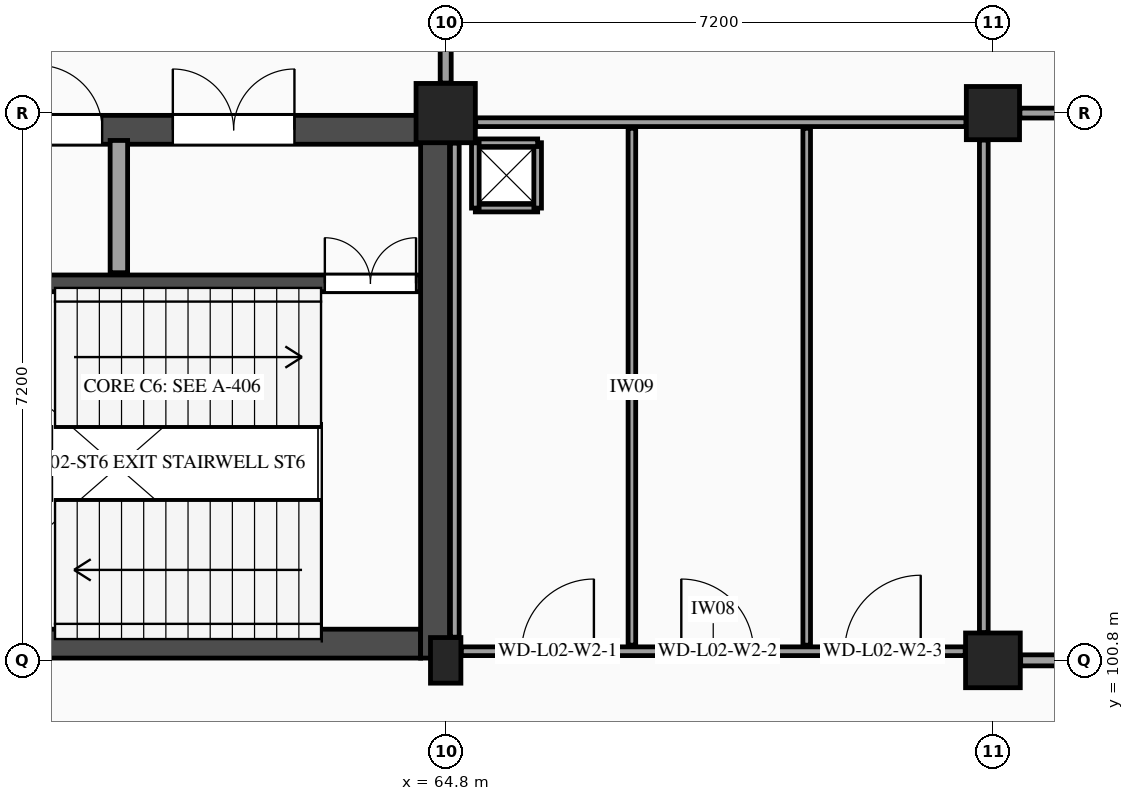
"""IFC4 building model, lengths in metres.
Left out: names, types, materials, properties, quantities, classifications, styles, units other than length and angle.
Written with IfcOpenShell. Run it as: python <this file> out.ifc"""

import sys

from ifc_helpers import new_model, si_unit, direction, frame, frame_2d, origin, origin_2d, place, context, subcontext, project, spatial, rectangle, extrude, element, fill, save


model = new_model("IFC4")
c1 = context("Model", 3, precision=1e-05, world=origin(), true_north=direction((0.0, 1.0)))
c2 = subcontext(c1, "Body", "Model", "MODEL_VIEW")
j1 = project(units=[si_unit("LENGTHUNIT", "METRE"), si_unit("PLANEANGLEUNIT", "RADIAN")], contexts=[c1])
p1 = place(None, origin())
s1 = spatial("IfcSite", under=j1, at=p1, CompositionType="ELEMENT")
p2 = place(p1, origin())
s2 = spatial("IfcBuilding", under=s1, at=p2, CompositionType="ELEMENT")
p3 = place(p2, frame((0.0, 0.0, 9.9)))
s3 = spatial("IfcBuildingStorey", under=s2, at=p3, CompositionType="ELEMENT", Elevation=9.9)
p4 = place(p3, frame((64.8, 100.8, 0.0), z_axis=(0.0, 0.0, 1.0), x_axis=(1.0, 0.0, 0.0)))
e1 = element("IfcColumn", 1, at=p4, inside=s3, PredefinedType="PILASTER", context=c2, shape_type="SweptSolid", body=[
    extrude(rectangle(XDim=0.4, YDim=0.6, at=origin_2d()), origin(), (0.0, 0.0, 1.0), 4.5),
])
p5 = place(p3, frame((64.8, 108.0, 0.0), z_axis=(0.0, 0.0, 1.0), x_axis=(1.0, 0.0, 0.0)))
e2 = element("IfcColumn", 2, at=p5, inside=s3, PredefinedType="COLUMN", context=c2, shape_type="SweptSolid", body=[
    extrude(rectangle(XDim=0.78, YDim=0.78, at=origin_2d()), origin(), (0.0, 0.0, 1.0), 4.5),
])
p6 = place(p3, frame((72.0, 100.8, 0.0), z_axis=(0.0, 0.0, 1.0), x_axis=(1.0, 0.0, 0.0)))
e3 = element("IfcColumn", 3, at=p6, inside=s3, PredefinedType="COLUMN", context=c2, shape_type="SweptSolid", body=[
    extrude(rectangle(XDim=0.72, YDim=0.72, at=origin_2d()), origin(), (0.0, 0.0, 1.0), 4.5),
])
p7 = place(p3, frame((72.0, 108.0, 0.0), z_axis=(0.0, 0.0, 1.0), x_axis=(1.0, 0.0, 0.0)))
e4 = element("IfcColumn", 4, at=p7, inside=s3, PredefinedType="COLUMN", context=c2, shape_type="SweptSolid", body=[
    extrude(rectangle(XDim=0.7, YDim=0.7, at=origin_2d()), origin(), (0.0, 0.0, 1.0), 4.5),
])
p8 = place(p3, frame((58.01, 101.02, 0.0), z_axis=(0.0, 0.0, 1.0), x_axis=(1.0, 0.0, 0.0)))
e5 = element("IfcWall", 5, at=p8, inside=s3, PredefinedType="SHEAR", context=c2, shape_type="SweptSolid", body=[
    extrude(rectangle(XDim=6.46, YDim=0.38, at=frame_2d((3.23, 0.0))), origin(), (0.0, 0.0, 1.0), 4.225),
])
p9 = place(p3, frame((58.01, 107.78, 0.0), z_axis=(0.0, 0.0, 1.0), x_axis=(1.0, 0.0, 0.0)))
e6 = element("IfcWall", 6, at=p9, inside=s3, PredefinedType="SHEAR", context=c2, shape_type="SweptSolid", body=[
    extrude(rectangle(XDim=6.46, YDim=0.38, at=frame_2d((3.23, 0.0))), origin(), (0.0, 0.0, 1.0), 4.225),
])
p10 = place(p9, frame((1.42, 0.0, 0.0)))
e7 = element("IfcOpeningElement", 7, at=p10, cuts=e6, PredefinedType="OPENING", context=c2, shape_type="SweptSolid", body=[
    extrude(rectangle(XDim=0.85, YDim=2.1, at=frame_2d((0.425, 1.05))), frame((0.0, 0.2, 0.0), z_axis=(0.0, -1.0, 0.0), x_axis=(1.0, 0.0, 0.0)), (0.0, 0.0, 1.0), 0.4),
])
p11 = place(p9, frame((3.2, 0.0, 0.0)))
e8 = element("IfcOpeningElement", 8, at=p11, cuts=e6, PredefinedType="OPENING", context=c2, shape_type="SweptSolid", body=[
    extrude(rectangle(XDim=1.6, YDim=2.2, at=frame_2d((0.8, 1.1))), frame((0.0, 0.2, 0.0), z_axis=(0.0, -1.0, 0.0), x_axis=(1.0, 0.0, 0.0)), (0.0, 0.0, 1.0), 0.4),
])
p12 = place(p3, frame((58.01, 105.76, 0.0), z_axis=(0.0, 0.0, 1.0), x_axis=(1.0, 0.0, 0.0)))
e9 = element("IfcWall", 9, at=p12, inside=s3, PredefinedType="SHEAR", context=c2, shape_type="SweptSolid", body=[
    extrude(rectangle(XDim=6.46, YDim=0.22, at=frame_2d((3.23, 0.0))), origin(), (0.0, 0.0, 1.0), 4.225),
])
p13 = place(p12, frame((5.2, 0.0, 0.0)))
e10 = element("IfcOpeningElement", 10, at=p13, cuts=e9, PredefinedType="OPENING", context=c2, shape_type="SweptSolid", body=[
    extrude(rectangle(XDim=1.2, YDim=2.2, at=frame_2d((0.6, 1.1))), frame((0.0, 0.12, 0.0), z_axis=(0.0, -1.0, 0.0), x_axis=(1.0, 0.0, 0.0)), (0.0, 0.0, 1.0), 0.24),
])
p14 = place(p3, frame((60.5, 105.9, 0.0), z_axis=(0.0, 0.0, 1.0), x_axis=(0.0, 1.0, 0.0)))
e11 = element("IfcWall", 11, at=p14, inside=s3, PredefinedType="PARTITIONING", context=c2, shape_type="SweptSolid", body=[
    extrude(rectangle(XDim=1.74, YDim=0.23, at=frame_2d((0.87, 0.0))), origin(), (0.0, 0.0, 1.0), 4.225),
])
p15 = place(p3, frame((64.66, 100.83, 0.0), z_axis=(0.0, 0.0, 1.0), x_axis=(0.0, 1.0, 0.0)))
e12 = element("IfcWall", 12, at=p15, inside=s3, PredefinedType="SHEAR", context=c2, shape_type="SweptSolid", body=[
    extrude(rectangle(XDim=7.14, YDim=0.38, at=frame_2d((3.57, 0.0))), origin(), (0.0, 0.0, 1.0), 4.225),
])
p16 = place(p3, frame((65.005, 100.92, 0.0), z_axis=(0.0, 0.0, 1.0), x_axis=(1.0, 0.0, 0.0)))
e13 = element("IfcWall", 13, at=p16, inside=s3, PredefinedType="PARTITIONING", context=c2, shape_type="SweptSolid", body=[
    extrude(rectangle(XDim=6.63, YDim=0.115, at=frame_2d((3.315, 0.0))), origin(), (0.0, 0.0, 1.0), 3.475),
])
p17 = place(p16, frame((0.795, 0.0, 0.0)))
e14 = element("IfcOpeningElement", 14, at=p17, cuts=e13, PredefinedType="OPENING", context=c2, shape_type="SweptSolid", body=[
    extrude(rectangle(XDim=0.95, YDim=2.1, at=frame_2d((0.475, 1.05))), frame((0.0, 0.067, 0.0), z_axis=(0.0, -1.0, 0.0), x_axis=(1.0, 0.0, 0.0)), (0.0, 0.0, 1.0), 0.135),
])
p18 = place(p16, frame((2.895, 0.0, 0.0)))
e15 = element("IfcOpeningElement", 15, at=p18, cuts=e13, PredefinedType="OPENING", context=c2, shape_type="SweptSolid", body=[
    extrude(rectangle(XDim=0.95, YDim=2.1, at=frame_2d((0.475, 1.05))), frame((0.0, 0.067, 0.0), z_axis=(0.0, -1.0, 0.0), x_axis=(1.0, 0.0, 0.0)), (0.0, 0.0, 1.0), 0.135),
])
p19 = place(p16, frame((5.045, 0.0, 0.0)))
e16 = element("IfcOpeningElement", 16, at=p19, cuts=e13, PredefinedType="OPENING", context=c2, shape_type="SweptSolid", body=[
    extrude(rectangle(XDim=1.0, YDim=2.15, at=frame_2d((0.5, 1.075))), frame((0.0, 0.067, 0.0), z_axis=(0.0, -1.0, 0.0), x_axis=(1.0, 0.0, 0.0)), (0.0, 0.0, 1.0), 0.135),
])
p20 = place(p3, frame((65.195, 107.88, 0.0), z_axis=(0.0, 0.0, 1.0), x_axis=(1.0, 0.0, 0.0)))
e17 = element("IfcWall", 17, at=p20, inside=s3, PredefinedType="PARTITIONING", context=c2, shape_type="SweptSolid", body=[
    extrude(rectangle(XDim=6.45, YDim=0.115, at=frame_2d((3.225, 0.0))), origin(), (0.0, 0.0, 1.0), 3.475),
])
p21 = place(p3, frame((64.92, 101.105, 0.0), z_axis=(0.0, 0.0, 1.0), x_axis=(0.0, 1.0, 0.0)))
e18 = element("IfcWall", 18, at=p21, inside=s3, PredefinedType="PARTITIONING", context=c2, shape_type="SweptSolid", body=[
    extrude(rectangle(XDim=6.5, YDim=0.115, at=frame_2d((3.25, 0.0))), origin(), (0.0, 0.0, 1.0), 3.54),
])
p22 = place(p3, frame((71.88, 101.165, 0.0), z_axis=(0.0, 0.0, 1.0), x_axis=(0.0, 1.0, 0.0)))
e19 = element("IfcWall", 19, at=p22, inside=s3, PredefinedType="PARTITIONING", context=c2, shape_type="SweptSolid", body=[
    extrude(rectangle(XDim=6.48, YDim=0.115, at=frame_2d((3.24, 0.0))), origin(), (0.0, 0.0, 1.0), 3.54),
])
for number, where, z_axis, x_axis in (
    (20, (67.25, 101.0, 0.0), (0.0, 0.0, 1.0), (0.0, 1.0, 0.0)),
    (21, (69.55, 101.0, 0.0), (0.0, 0.0, 1.0), (0.0, 1.0, 0.0)),
):
    element("IfcWall", number, at=place(p3, frame(where, z_axis=z_axis, x_axis=x_axis)), inside=s3, PredefinedType="PARTITIONING", context=c2, shape_type="SweptSolid", body=[
        extrude(rectangle(XDim=6.8, YDim=0.1, at=frame_2d((3.4, 0.0))), origin(), (0.0, 0.0, 1.0), 4.225),
    ])
p23 = place(p3, frame((65.19, 106.75, 0.0), z_axis=(0.0, 0.0, 1.0), x_axis=(1.0, 0.0, 0.0)))
e22 = element("IfcWall", 22, at=p23, inside=s3, PredefinedType="PARTITIONING", context=c2, shape_type="SweptSolid", body=[
    extrude(rectangle(XDim=0.82, YDim=0.1, at=frame_2d((0.41, 0.0))), origin(), (0.0, 0.0, 1.0), 4.225),
])
p24 = place(p3, frame((66.01, 106.75, 0.0), z_axis=(0.0, 0.0, 1.0), x_axis=(0.0, 1.0, 0.0)))
e23 = element("IfcWall", 23, at=p24, inside=s3, PredefinedType="PARTITIONING", context=c2, shape_type="SweptSolid", body=[
    extrude(rectangle(XDim=0.86, YDim=0.1, at=frame_2d((0.43, 0.0))), origin(), (0.0, 0.0, 1.0), 4.225),
])
p25 = place(p3, frame((66.01, 107.61, 0.0), z_axis=(0.0, 0.0, 1.0), x_axis=(-1.0, 0.0, 0.0)))
e24 = element("IfcWall", 24, at=p25, inside=s3, PredefinedType="PARTITIONING", context=c2, shape_type="SweptSolid", body=[
    extrude(rectangle(XDim=0.82, YDim=0.1, at=frame_2d((0.41, 0.0))), origin(), (0.0, 0.0, 1.0), 4.225),
])
p26 = place(p3, frame((65.19, 107.61, 0.0), z_axis=(0.0, 0.0, 1.0), x_axis=(0.0, -1.0, 0.0)))
e25 = element("IfcWall", 25, at=p26, inside=s3, PredefinedType="PARTITIONING", context=c2, shape_type="SweptSolid", body=[
    extrude(rectangle(XDim=0.86, YDim=0.1, at=frame_2d((0.43, 0.0))), origin(), (0.0, 0.0, 1.0), 4.225),
])
p27 = place(p3, frame((64.8, 108.395, 0.0), z_axis=(0.0, 0.0, 1.0), x_axis=(0.0, 1.0, 0.0)))
e26 = element("IfcWall", 26, at=p27, inside=s3, PredefinedType="PARTITIONING", context=c2, shape_type="SweptSolid", body=[
    extrude(rectangle(XDim=6.425, YDim=0.145, at=frame_2d((3.212, 0.0))), origin(), (0.0, 0.0, 1.0), 3.535),
])
p28 = place(p27, frame((2.413, 0.0, 0.0)))
e27 = element("IfcOpeningElement", 27, at=p28, cuts=e26, PredefinedType="OPENING", context=c2, shape_type="SweptSolid", body=[
    extrude(rectangle(XDim=1.6, YDim=2.2, at=frame_2d((0.8, 1.1))), frame((0.0, 0.083, 0.0), z_axis=(0.0, -1.0, 0.0), x_axis=(1.0, 0.0, 0.0)), (0.0, 0.0, 1.0), 0.165),
])
p29 = place(p3, frame((72.365, 100.8, 0.0), z_axis=(0.0, 0.0, 1.0), x_axis=(1.0, 0.0, 0.0)))
e28 = element("IfcWall", 28, at=p29, inside=s3, PredefinedType="PARTITIONING", context=c2, shape_type="SweptSolid", body=[
    extrude(rectangle(XDim=6.63, YDim=0.145, at=frame_2d((3.315, 0.0))), origin(), (0.0, 0.0, 1.0), 3.485),
])
p30 = place(p29, frame((2.515, 0.0, 0.0)))
e29 = element("IfcOpeningElement", 29, at=p30, cuts=e28, PredefinedType="OPENING", context=c2, shape_type="SweptSolid", body=[
    extrude(rectangle(XDim=1.6, YDim=2.2, at=frame_2d((0.8, 1.1))), frame((0.0, 0.083, 0.0), z_axis=(0.0, -1.0, 0.0), x_axis=(1.0, 0.0, 0.0)), (0.0, 0.0, 1.0), 0.165),
])
p31 = place(p3, frame((72.355, 108.0, 0.0), z_axis=(0.0, 0.0, 1.0), x_axis=(1.0, 0.0, 0.0)))
e30 = element("IfcWall", 30, at=p31, inside=s3, PredefinedType="PARTITIONING", context=c2, shape_type="SweptSolid", body=[
    extrude(rectangle(XDim=6.45, YDim=0.13, at=frame_2d((3.225, 0.0))), origin(), (0.0, 0.0, 1.0), 3.485),
])
p32 = place(p10, origin())
e31 = element("IfcDoor", 31, at=p32, inside=s3, OperationType="SINGLE_SWING_LEFT", PredefinedType="DOOR", context=c2, shape_type="SweptSolid", body=[
    extrude(rectangle(XDim=0.85, YDim=2.1, at=frame_2d((0.425, 1.05))), frame((0.0, 0.025, 0.0), z_axis=(0.0, -1.0, 0.0), x_axis=(1.0, 0.0, 0.0)), (0.0, 0.0, 1.0), 0.05),
])
fill(e7, e31)
p33 = place(p13, origin())
e32 = element("IfcDoor", 32, at=p33, inside=s3, OperationType="DOUBLE_DOOR_SINGLE_SWING", PredefinedType="DOOR", context=c2, shape_type="SweptSolid", body=[
    extrude(rectangle(XDim=1.2, YDim=2.2, at=frame_2d((0.6, 1.1))), frame((0.0, 0.025, 0.0), z_axis=(0.0, -1.0, 0.0), x_axis=(1.0, 0.0, 0.0)), (0.0, 0.0, 1.0), 0.05),
])
fill(e10, e32)
p34 = place(p11, frame((1.6, 0.0, 0.0), z_axis=(0.0, 0.0, 1.0), x_axis=(-1.0, 0.0, 0.0)))
e33 = element("IfcDoor", 33, at=p34, inside=s3, OperationType="DOUBLE_DOOR_SINGLE_SWING", PredefinedType="DOOR", context=c2, shape_type="SweptSolid", body=[
    extrude(rectangle(XDim=1.6, YDim=2.2, at=frame_2d((0.8, 1.1))), frame((0.0, 0.025, 0.0), z_axis=(0.0, -1.0, 0.0), x_axis=(1.0, 0.0, 0.0)), (0.0, 0.0, 1.0), 0.05),
])
fill(e8, e33)
p35 = place(p17, origin())
e34 = element("IfcDoor", 34, at=p35, inside=s3, OperationType="SINGLE_SWING_RIGHT", PredefinedType="DOOR", context=c2, shape_type="SweptSolid", body=[
    extrude(rectangle(XDim=0.95, YDim=2.1, at=frame_2d((0.475, 1.05))), frame((0.0, 0.025, 0.0), z_axis=(0.0, -1.0, 0.0), x_axis=(1.0, 0.0, 0.0)), (0.0, 0.0, 1.0), 0.05),
])
fill(e14, e34)
p36 = place(p18, origin())
e35 = element("IfcDoor", 35, at=p36, inside=s3, OperationType="SINGLE_SWING_LEFT", PredefinedType="DOOR", context=c2, shape_type="SweptSolid", body=[
    extrude(rectangle(XDim=0.95, YDim=2.1, at=frame_2d((0.475, 1.05))), frame((0.0, 0.025, 0.0), z_axis=(0.0, -1.0, 0.0), x_axis=(1.0, 0.0, 0.0)), (0.0, 0.0, 1.0), 0.05),
])
fill(e15, e35)
p37 = place(p19, origin())
e36 = element("IfcDoor", 36, at=p37, inside=s3, OperationType="SINGLE_SWING_RIGHT", PredefinedType="DOOR", context=c2, shape_type="SweptSolid", body=[
    extrude(rectangle(XDim=1.0, YDim=2.15, at=frame_2d((0.5, 1.075))), frame((0.0, 0.025, 0.0), z_axis=(0.0, -1.0, 0.0), x_axis=(1.0, 0.0, 0.0)), (0.0, 0.0, 1.0), 0.05),
])
fill(e16, e36)
save(model, sys.argv[1])
